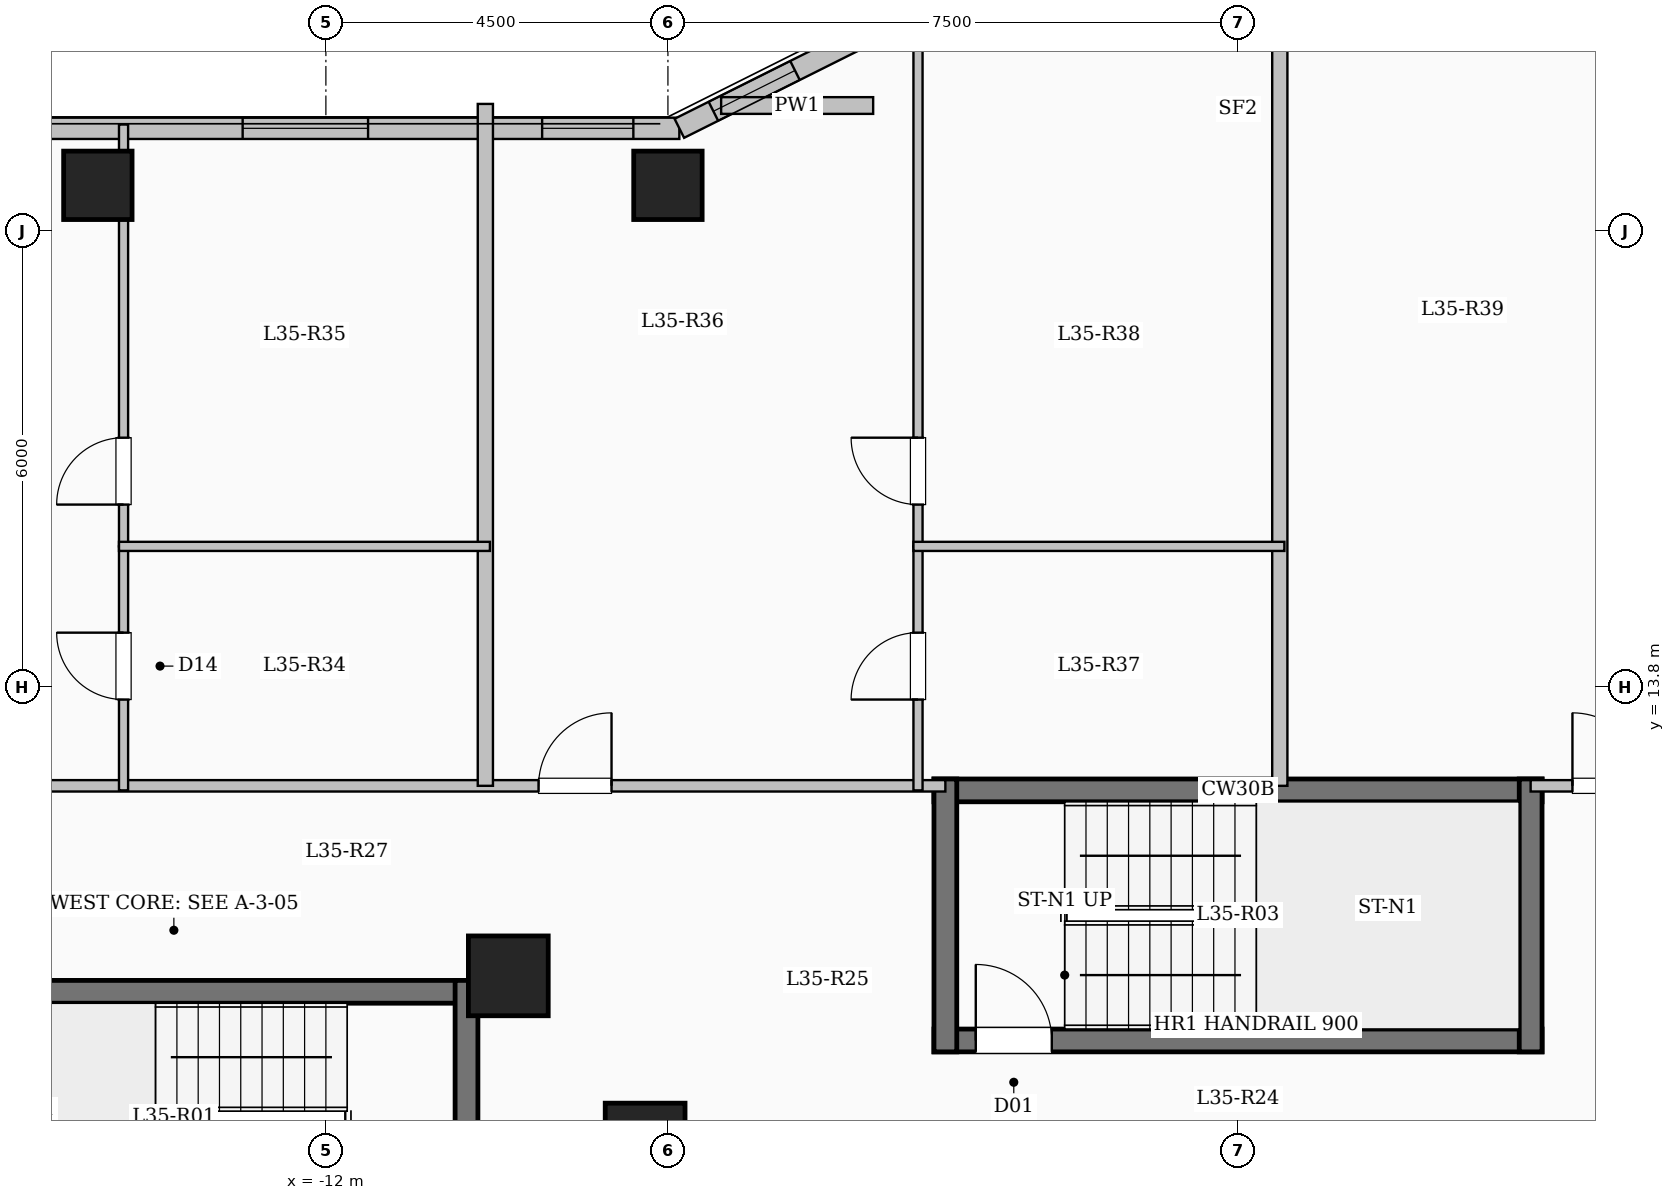
"""IFC4 building model, lengths in metres.
Left out: names, types, materials, properties, quantities, classifications, styles, units other than length and angle.
Written with IfcOpenShell. Run it as: python <this file> out.ifc"""

import sys

from ifc_helpers import new_model, si_unit, direction, frame, frame_2d, origin, origin_2d, place, context, subcontext, project, spatial, rectangle, extrude, element, fill, save


model = new_model("IFC4")
c1 = context("Model", 3, precision=1e-05, world=origin(), true_north=direction((0.0, 1.0)))
c2 = subcontext(c1, "Body", "Model", "MODEL_VIEW")
j1 = project(units=[si_unit("LENGTHUNIT", "METRE"), si_unit("PLANEANGLEUNIT", "RADIAN")], contexts=[c1])
p1 = place(None, origin())
s1 = spatial("IfcSite", under=j1, at=p1, CompositionType="ELEMENT")
p2 = place(p1, origin())
s2 = spatial("IfcBuilding", under=s1, at=p2, CompositionType="ELEMENT")
p3 = place(p2, frame((0.0, 0.0, 132.6)))
s3 = spatial("IfcBuildingStorey", under=s2, at=p3, CompositionType="ELEMENT", Elevation=132.6)
for number, where, z_axis, x_axis in (
    (1, (-7.8, 7.8, 0.0), (0.0, 0.0, 1.0), (1.0, 0.0, 0.0)),
    (2, (-9.6, 10.0, 0.0), (0.0, 0.0, 1.0), (1.0, 0.0, 0.0)),
):
    element("IfcColumn", number, at=place(p3, frame(where, z_axis=z_axis, x_axis=x_axis)), inside=s3, PredefinedType="COLUMN", context=c2, shape_type="SweptSolid", body=[
        extrude(rectangle(XDim=1.05, YDim=1.05, at=origin_2d()), origin(), (0.0, 0.0, 1.0), 3.35),
    ])
for number, where, z_axis, x_axis in (
    (3, (-15.0, 20.4, 0.0), (0.0, 0.0, 1.0), (1.0, 0.0, 0.0)),
    (4, (-7.5, 20.4, 0.0), (0.0, 0.0, 1.0), (1.0, 0.0, 0.0)),
):
    element("IfcColumn", number, at=place(p3, frame(where, z_axis=z_axis, x_axis=x_axis)), inside=s3, PredefinedType="COLUMN", context=c2, shape_type="SweptSolid", body=[
        extrude(rectangle(XDim=0.9, YDim=0.9, at=origin_2d()), origin(), (0.0, 0.0, 1.0), 3.35),
    ])
p4 = place(p3, frame((-19.65, 21.15, 0.0), z_axis=(0.0, 0.0, 1.0), x_axis=(1.0, 0.0, 0.0)))
e5 = element("IfcWall", 5, at=p4, inside=s3, PredefinedType="SOLIDWALL", context=c2, shape_type="SweptSolid", body=[
    extrude(rectangle(XDim=12.3, YDim=0.28, at=frame_2d((6.15, 0.0))), origin(), (0.0, 0.0, 1.0), 3.1),
])
p5 = place(p4, frame((1.435, 0.0, 0.9)))
e6 = element("IfcOpeningElement", 6, at=p5, cuts=e5, PredefinedType="OPENING", context=c2, shape_type="SweptSolid", body=[
    extrude(rectangle(XDim=2.2, YDim=1.75, at=frame_2d((1.1, 0.875))), frame((0.0, 0.15, 0.0), z_axis=(0.0, -1.0, 0.0), x_axis=(1.0, 0.0, 0.0)), (0.0, 0.0, 1.0), 0.3),
])
p6 = place(p4, frame((6.555, 0.0, 0.9)))
e7 = element("IfcOpeningElement", 7, at=p6, cuts=e5, PredefinedType="OPENING", context=c2, shape_type="SweptSolid", body=[
    extrude(rectangle(XDim=1.65, YDim=1.6, at=frame_2d((0.825, 0.8))), frame((0.0, 0.15, 0.0), z_axis=(0.0, -1.0, 0.0), x_axis=(1.0, 0.0, 0.0)), (0.0, 0.0, 1.0), 0.3),
])
p7 = place(p4, frame((10.495, 0.0, 0.95)))
e8 = element("IfcOpeningElement", 8, at=p7, cuts=e5, PredefinedType="OPENING", context=c2, shape_type="SweptSolid", body=[
    extrude(rectangle(XDim=1.2, YDim=1.5, at=frame_2d((0.6, 0.75))), frame((0.0, 0.15, 0.0), z_axis=(0.0, -1.0, 0.0), x_axis=(1.0, 0.0, 0.0)), (0.0, 0.0, 1.0), 0.3),
])
p8 = place(p3, frame((-7.35, 21.15, 0.0), z_axis=(0.0, 0.0, 1.0), x_axis=(0.894427191, 0.4472135955, 0.0)))
e9 = element("IfcWall", 9, at=p8, inside=s3, PredefinedType="SOLIDWALL", context=c2, shape_type="SweptSolid", body=[
    extrude(rectangle(XDim=3.354, YDim=0.28, at=frame_2d((1.677, 0.0))), origin(), (0.0, 0.0, 1.0), 3.1),
])
p9 = place(p8, frame((0.501, 0.0, 0.95)))
e10 = element("IfcOpeningElement", 10, at=p9, cuts=e9, PredefinedType="OPENING", context=c2, shape_type="SweptSolid", body=[
    extrude(rectangle(XDim=1.2, YDim=1.5, at=frame_2d((0.6, 0.75))), frame((0.0, 0.15, 0.0), z_axis=(0.0, -1.0, 0.0), x_axis=(1.0, 0.0, 0.0)), (0.0, 0.0, 1.0), 0.3),
])
p10 = place(p3, frame((4.35, 22.65, 0.0), z_axis=(0.0, 0.0, 1.0), x_axis=(0.894427191, -0.4472135955, 0.0)))
e11 = element("IfcWall", 11, at=p10, inside=s3, PredefinedType="SOLIDWALL", context=c2, shape_type="SweptSolid", body=[
    extrude(rectangle(XDim=3.354, YDim=0.28, at=frame_2d((1.677, 0.0))), origin(), (0.0, 0.0, 1.0), 3.1),
])
p11 = place(p10, frame((2.108, 0.0, 0.95)))
e12 = element("IfcOpeningElement", 12, at=p11, cuts=e11, PredefinedType="OPENING", context=c2, shape_type="SweptSolid", body=[
    extrude(rectangle(XDim=0.85, YDim=1.5, at=frame_2d((0.425, 0.75))), frame((0.0, 0.15, 0.0), z_axis=(0.0, -1.0, 0.0), x_axis=(1.0, 0.0, 0.0)), (0.0, 0.0, 1.0), 0.3),
])
p12 = place(p3, frame((-6.8, 21.45, 0.0), z_axis=(0.0, 0.0, 1.0), x_axis=(1.0, 0.0, 0.0)))
e13 = element("IfcWall", 13, at=p12, inside=s3, PredefinedType="PARAPET", context=c2, shape_type="SweptSolid", body=[
    extrude(rectangle(XDim=2.0, YDim=0.22, at=frame_2d((1.0, 0.0))), origin(), (0.0, 0.0, 1.0), 0.85),
])
p13 = place(p3, frame((-18.0, 9.79, 0.0), z_axis=(0.0, 0.0, 1.0), x_axis=(1.0, 0.0, 0.0)))
e14 = element("IfcWall", 14, at=p13, inside=s3, PredefinedType="SHEAR", context=c2, shape_type="SweptSolid", body=[
    extrude(rectangle(XDim=8.0, YDim=0.3, at=frame_2d((4.0, 0.0))), origin(), (0.0, 0.0, 1.0), 3.35),
])
p14 = place(p3, frame((-10.15, 6.35, 0.0), z_axis=(0.0, 0.0, 1.0), x_axis=(0.0, 1.0, 0.0)))
e15 = element("IfcWall", 15, at=p14, inside=s3, PredefinedType="SHEAR", context=c2, shape_type="SweptSolid", body=[
    extrude(rectangle(XDim=3.59, YDim=0.3, at=frame_2d((1.795, 0.0))), origin(), (0.0, 0.0, 1.0), 3.35),
])
p15 = place(p3, frame((-4.0, 12.44, 0.0), z_axis=(0.0, 0.0, 1.0), x_axis=(1.0, 0.0, 0.0)))
e16 = element("IfcWall", 16, at=p15, inside=s3, PredefinedType="SHEAR", context=c2, shape_type="SweptSolid", body=[
    extrude(rectangle(XDim=8.0, YDim=0.3, at=frame_2d((4.0, 0.0))), origin(), (0.0, 0.0, 1.0), 3.35),
])
p16 = place(p3, frame((-4.0, 9.15, 0.0), z_axis=(0.0, 0.0, 1.0), x_axis=(1.0, 0.0, 0.0)))
e17 = element("IfcWall", 17, at=p16, inside=s3, PredefinedType="SHEAR", context=c2, shape_type="SweptSolid", body=[
    extrude(rectangle(XDim=8.0, YDim=0.3, at=frame_2d((4.0, 0.0))), origin(), (0.0, 0.0, 1.0), 3.35),
])
p17 = place(p16, frame((0.55, 0.0, 0.0)))
e18 = element("IfcOpeningElement", 18, at=p17, cuts=e17, PredefinedType="OPENING", context=c2, shape_type="SweptSolid", body=[
    extrude(rectangle(XDim=1.0, YDim=2.15, at=frame_2d((0.5, 1.075))), frame((0.0, 0.16, 0.0), z_axis=(0.0, -1.0, 0.0), x_axis=(1.0, 0.0, 0.0)), (0.0, 0.0, 1.0), 0.32),
])
for number, where, z_axis, x_axis in (
    (19, (-3.85, 9.0, 0.0), (0.0, 0.0, 1.0), (0.0, 1.0, 0.0)),
    (20, (3.85, 9.0, 0.0), (0.0, 0.0, 1.0), (0.0, 1.0, 0.0)),
):
    element("IfcWall", number, at=place(p3, frame(where, z_axis=z_axis, x_axis=x_axis)), inside=s3, PredefinedType="SHEAR", context=c2, shape_type="SweptSolid", body=[
        extrude(rectangle(XDim=3.59, YDim=0.3, at=frame_2d((1.795, 0.0))), origin(), (0.0, 0.0, 1.0), 3.35),
    ])
p18 = place(p3, frame((-19.55, 12.5, 0.0), z_axis=(0.0, 0.0, 1.0), x_axis=(1.0, 0.0, 0.0)))
e21 = element("IfcWall", 21, at=p18, inside=s3, PredefinedType="PARTITIONING", context=c2, shape_type="SweptSolid", body=[
    extrude(rectangle(XDim=15.7, YDim=0.15, at=frame_2d((7.85, 0.0))), origin(), (0.0, 0.0, 1.0), 3.1),
])
p19 = place(p18, frame((0.7, 0.0, 0.0)))
e22 = element("IfcOpeningElement", 22, at=p19, cuts=e21, PredefinedType="OPENING", context=c2, shape_type="SweptSolid", body=[
    extrude(rectangle(XDim=0.96, YDim=2.15, at=frame_2d((0.48, 1.075))), frame((0.0, 0.085, 0.0), z_axis=(0.0, -1.0, 0.0), x_axis=(1.0, 0.0, 0.0)), (0.0, 0.0, 1.0), 0.17),
])
p20 = place(p18, frame((10.348, 0.0, 0.0)))
e23 = element("IfcOpeningElement", 23, at=p20, cuts=e21, PredefinedType="OPENING", context=c2, shape_type="SweptSolid", body=[
    extrude(rectangle(XDim=0.96, YDim=2.15, at=frame_2d((0.48, 1.075))), frame((0.0, 0.085, 0.0), z_axis=(0.0, -1.0, 0.0), x_axis=(1.0, 0.0, 0.0)), (0.0, 0.0, 1.0), 0.17),
])
p21 = place(p3, frame((3.85, 12.5, 0.0), z_axis=(0.0, 0.0, 1.0), x_axis=(1.0, 0.0, 0.0)))
e24 = element("IfcWall", 24, at=p21, inside=s3, PredefinedType="PARTITIONING", context=c2, shape_type="SweptSolid", body=[
    extrude(rectangle(XDim=15.7, YDim=0.15, at=frame_2d((7.85, 0.0))), origin(), (0.0, 0.0, 1.0), 3.1),
])
p22 = place(p21, frame((0.55, 0.0, 0.0)))
e25 = element("IfcOpeningElement", 25, at=p22, cuts=e24, PredefinedType="OPENING", context=c2, shape_type="SweptSolid", body=[
    extrude(rectangle(XDim=0.96, YDim=2.15, at=frame_2d((0.48, 1.075))), frame((0.0, 0.085, 0.0), z_axis=(0.0, -1.0, 0.0), x_axis=(1.0, 0.0, 0.0)), (0.0, 0.0, 1.0), 0.17),
])
p23 = place(p21, frame((7.28, 0.0, 0.0)))
e26 = element("IfcOpeningElement", 26, at=p23, cuts=e24, PredefinedType="OPENING", context=c2, shape_type="SweptSolid", body=[
    extrude(rectangle(XDim=0.96, YDim=2.15, at=frame_2d((0.48, 1.075))), frame((0.0, 0.085, 0.0), z_axis=(0.0, -1.0, 0.0), x_axis=(1.0, 0.0, 0.0)), (0.0, 0.0, 1.0), 0.17),
])
p24 = place(p3, frame((0.55, 12.5, 0.0), z_axis=(0.0, 0.0, 1.0), x_axis=(0.0, 1.0, 0.0)))
e27 = element("IfcWall", 27, at=p24, inside=s3, PredefinedType="SOLIDWALL", context=c2, shape_type="SweptSolid", body=[
    extrude(rectangle(XDim=10.18, YDim=0.2, at=frame_2d((5.09, 0.0))), origin(), (0.0, 0.0, 1.0), 3.1),
])
p25 = place(p3, frame((-9.902, 12.5, 0.0), z_axis=(0.0, 0.0, 1.0), x_axis=(0.0, 1.0, 0.0)))
e28 = element("IfcWall", 28, at=p25, inside=s3, PredefinedType="SOLIDWALL", context=c2, shape_type="SweptSolid", body=[
    extrude(rectangle(XDim=8.971, YDim=0.2, at=frame_2d((4.485, 0.0))), origin(), (0.0, 0.0, 1.0), 3.1),
])
p26 = place(p3, frame((-14.662, 12.44, 0.0), z_axis=(0.0, 0.0, 1.0), x_axis=(0.0, 1.0, 0.0)))
e29 = element("IfcWall", 29, at=p26, inside=s3, PredefinedType="PARTITIONING", context=c2, shape_type="SweptSolid", body=[
    extrude(rectangle(XDim=3.21, YDim=0.12, at=frame_2d((1.605, 0.0))), origin(), (0.0, 0.0, 1.0), 3.1),
])
p27 = place(p26, frame((1.195, 0.0, 0.0)))
e30 = element("IfcOpeningElement", 30, at=p27, cuts=e29, PredefinedType="OPENING", context=c2, shape_type="SweptSolid", body=[
    extrude(rectangle(XDim=0.88, YDim=2.1, at=frame_2d((0.44, 1.05))), frame((0.0, 0.07, 0.0), z_axis=(0.0, -1.0, 0.0), x_axis=(1.0, 0.0, 0.0)), (0.0, 0.0, 1.0), 0.14),
])
p28 = place(p3, frame((-14.662, 15.65, 0.0), z_axis=(0.0, 0.0, 1.0), x_axis=(0.0, 1.0, 0.0)))
e31 = element("IfcWall", 31, at=p28, inside=s3, PredefinedType="PARTITIONING", context=c2, shape_type="SweptSolid", body=[
    extrude(rectangle(XDim=5.55, YDim=0.12, at=frame_2d((2.775, 0.0))), origin(), (0.0, 0.0, 1.0), 3.1),
])
p29 = place(p28, frame((0.55, 0.0, 0.0)))
e32 = element("IfcOpeningElement", 32, at=p29, cuts=e31, PredefinedType="OPENING", context=c2, shape_type="SweptSolid", body=[
    extrude(rectangle(XDim=0.88, YDim=2.1, at=frame_2d((0.44, 1.05))), frame((0.0, 0.07, 0.0), z_axis=(0.0, -1.0, 0.0), x_axis=(1.0, 0.0, 0.0)), (0.0, 0.0, 1.0), 0.14),
])
p30 = place(p3, frame((-14.722, 15.65, 0.0), z_axis=(0.0, 0.0, 1.0), x_axis=(1.0, 0.0, 0.0)))
e33 = element("IfcWall", 33, at=p30, inside=s3, PredefinedType="PARTITIONING", context=c2, shape_type="SweptSolid", body=[
    extrude(rectangle(XDim=4.88, YDim=0.12, at=frame_2d((2.44, 0.0))), origin(), (0.0, 0.0, 1.0), 2.685),
])
p31 = place(p3, frame((-4.21, 12.44, 0.0), z_axis=(0.0, 0.0, 1.0), x_axis=(0.0, 1.0, 0.0)))
e34 = element("IfcWall", 34, at=p31, inside=s3, PredefinedType="PARTITIONING", context=c2, shape_type="SweptSolid", body=[
    extrude(rectangle(XDim=3.21, YDim=0.12, at=frame_2d((1.605, 0.0))), origin(), (0.0, 0.0, 1.0), 3.1),
])
p32 = place(p31, frame((1.195, 0.0, 0.0)))
e35 = element("IfcOpeningElement", 35, at=p32, cuts=e34, PredefinedType="OPENING", context=c2, shape_type="SweptSolid", body=[
    extrude(rectangle(XDim=0.88, YDim=2.1, at=frame_2d((0.44, 1.05))), frame((0.0, 0.07, 0.0), z_axis=(0.0, -1.0, 0.0), x_axis=(1.0, 0.0, 0.0)), (0.0, 0.0, 1.0), 0.14),
])
p33 = place(p3, frame((-4.21, 15.65, 0.0), z_axis=(0.0, 0.0, 1.0), x_axis=(0.0, 1.0, 0.0)))
e36 = element("IfcWall", 36, at=p33, inside=s3, PredefinedType="PARTITIONING", context=c2, shape_type="SweptSolid", body=[
    extrude(rectangle(XDim=7.03, YDim=0.12, at=frame_2d((3.515, 0.0))), origin(), (0.0, 0.0, 1.0), 3.1),
])
p34 = place(p33, frame((0.55, 0.0, 0.0)))
e37 = element("IfcOpeningElement", 37, at=p34, cuts=e36, PredefinedType="OPENING", context=c2, shape_type="SweptSolid", body=[
    extrude(rectangle(XDim=0.88, YDim=2.1, at=frame_2d((0.44, 1.05))), frame((0.0, 0.07, 0.0), z_axis=(0.0, -1.0, 0.0), x_axis=(1.0, 0.0, 0.0)), (0.0, 0.0, 1.0), 0.14),
])
p35 = place(p3, frame((-4.27, 15.65, 0.0), z_axis=(0.0, 0.0, 1.0), x_axis=(1.0, 0.0, 0.0)))
e38 = element("IfcWall", 38, at=p35, inside=s3, PredefinedType="PARTITIONING", context=c2, shape_type="SweptSolid", body=[
    extrude(rectangle(XDim=4.88, YDim=0.12, at=frame_2d((2.44, 0.0))), origin(), (0.0, 0.0, 1.0), 2.685),
])
p36 = place(p6, origin())
e39 = element("IfcWindow", 39, at=p36, inside=s3, PartitioningType="SINGLE_PANEL", PredefinedType="WINDOW", context=c2, shape_type="SweptSolid", body=[
    extrude(rectangle(XDim=1.65, YDim=1.6, at=frame_2d((0.825, 0.8))), frame((0.0, 0.03, 0.0), z_axis=(0.0, -1.0, 0.0), x_axis=(1.0, 0.0, 0.0)), (0.0, 0.0, 1.0), 0.06),
])
fill(e7, e39)
p37 = place(p7, origin())
e40 = element("IfcWindow", 40, at=p37, inside=s3, PartitioningType="SINGLE_PANEL", PredefinedType="WINDOW", context=c2, shape_type="SweptSolid", body=[
    extrude(rectangle(XDim=1.2, YDim=1.5, at=frame_2d((0.6, 0.75))), frame((0.0, 0.03, 0.0), z_axis=(0.0, -1.0, 0.0), x_axis=(1.0, 0.0, 0.0)), (0.0, 0.0, 1.0), 0.06),
])
fill(e8, e40)
p38 = place(p9, origin())
e41 = element("IfcWindow", 41, at=p38, inside=s3, PartitioningType="SINGLE_PANEL", PredefinedType="WINDOW", context=c2, shape_type="SweptSolid", body=[
    extrude(rectangle(XDim=1.2, YDim=1.5, at=frame_2d((0.6, 0.75))), frame((0.0, 0.03, 0.0), z_axis=(0.0, -1.0, 0.0), x_axis=(1.0, 0.0, 0.0)), (0.0, 0.0, 1.0), 0.06),
])
fill(e10, e41)
p39 = place(p17, origin())
e42 = element("IfcDoor", 42, at=p39, inside=s3, OperationType="SINGLE_SWING_LEFT", PredefinedType="DOOR", context=c2, shape_type="SweptSolid", body=[
    extrude(rectangle(XDim=1.0, YDim=2.15, at=frame_2d((0.5, 1.075))), frame((0.0, 0.025, 0.0), z_axis=(0.0, -1.0, 0.0), x_axis=(1.0, 0.0, 0.0)), (0.0, 0.0, 1.0), 0.05),
])
fill(e18, e42)
p40 = place(p27, origin())
e43 = element("IfcDoor", 43, at=p40, inside=s3, OperationType="SINGLE_SWING_RIGHT", PredefinedType="DOOR", context=c2, shape_type="SweptSolid", body=[
    extrude(rectangle(XDim=0.88, YDim=2.1, at=frame_2d((0.44, 1.05))), frame((0.0, 0.025, 0.0), z_axis=(0.0, -1.0, 0.0), x_axis=(1.0, 0.0, 0.0)), (0.0, 0.0, 1.0), 0.05),
])
fill(e30, e43)
p41 = place(p29, origin())
e44 = element("IfcDoor", 44, at=p41, inside=s3, OperationType="SINGLE_SWING_LEFT", PredefinedType="DOOR", context=c2, shape_type="SweptSolid", body=[
    extrude(rectangle(XDim=0.88, YDim=2.1, at=frame_2d((0.44, 1.05))), frame((0.0, 0.025, 0.0), z_axis=(0.0, -1.0, 0.0), x_axis=(1.0, 0.0, 0.0)), (0.0, 0.0, 1.0), 0.05),
])
fill(e32, e44)
p42 = place(p20, origin())
e45 = element("IfcDoor", 45, at=p42, inside=s3, OperationType="SINGLE_SWING_RIGHT", PredefinedType="DOOR", context=c2, shape_type="SweptSolid", body=[
    extrude(rectangle(XDim=0.96, YDim=2.15, at=frame_2d((0.48, 1.075))), frame((0.0, 0.025, 0.0), z_axis=(0.0, -1.0, 0.0), x_axis=(1.0, 0.0, 0.0)), (0.0, 0.0, 1.0), 0.05),
])
fill(e23, e45)
p43 = place(p32, origin())
e46 = element("IfcDoor", 46, at=p43, inside=s3, OperationType="SINGLE_SWING_LEFT", PredefinedType="DOOR", context=c2, shape_type="SweptSolid", body=[
    extrude(rectangle(XDim=0.88, YDim=2.1, at=frame_2d((0.44, 1.05))), frame((0.0, 0.025, 0.0), z_axis=(0.0, -1.0, 0.0), x_axis=(1.0, 0.0, 0.0)), (0.0, 0.0, 1.0), 0.05),
])
fill(e35, e46)
p44 = place(p34, origin())
e47 = element("IfcDoor", 47, at=p44, inside=s3, OperationType="SINGLE_SWING_RIGHT", PredefinedType="DOOR", context=c2, shape_type="SweptSolid", body=[
    extrude(rectangle(XDim=0.88, YDim=2.1, at=frame_2d((0.44, 1.05))), frame((0.0, 0.025, 0.0), z_axis=(0.0, -1.0, 0.0), x_axis=(1.0, 0.0, 0.0)), (0.0, 0.0, 1.0), 0.05),
])
fill(e37, e47)
p45 = place(p22, origin())
e48 = element("IfcDoor", 48, at=p45, inside=s3, OperationType="SINGLE_SWING_LEFT", PredefinedType="DOOR", context=c2, shape_type="SweptSolid", body=[
    extrude(rectangle(XDim=0.96, YDim=2.15, at=frame_2d((0.48, 1.075))), frame((0.0, 0.025, 0.0), z_axis=(0.0, -1.0, 0.0), x_axis=(1.0, 0.0, 0.0)), (0.0, 0.0, 1.0), 0.05),
])
fill(e25, e48)
save(model, sys.argv[1])
